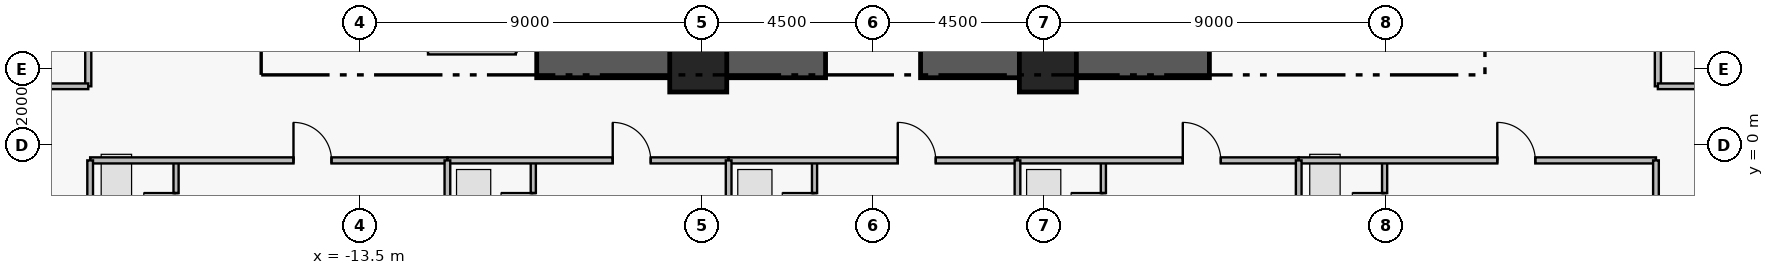
"""IFC4 building model, lengths in metres.
Left out: names, types, materials, properties, quantities, classifications, styles, units other than length and angle.
Written with IfcOpenShell. Run it as: python <this file> out.ifc"""

import sys

from ifc_helpers import new_model, si_unit, direction, frame, frame_2d, origin, origin_2d, place, context, subcontext, project, spatial, rectangle, extrude, element, fill, save


model = new_model("IFC4")
c1 = context("Model", 3, precision=1e-05, world=origin(), true_north=direction((0.0, 1.0)))
c2 = subcontext(c1, "Body", "Model", "MODEL_VIEW")
j1 = project(units=[si_unit("LENGTHUNIT", "METRE"), si_unit("PLANEANGLEUNIT", "RADIAN")], contexts=[c1])
p1 = place(None, origin())
s1 = spatial("IfcSite", under=j1, at=p1, CompositionType="ELEMENT")
p2 = place(p1, origin())
s2 = spatial("IfcBuilding", under=s1, at=p2, CompositionType="ELEMENT")
p3 = place(p2, frame((0.0, 0.0, 99.3)))
s3 = spatial("IfcBuildingStorey", under=s2, at=p3, CompositionType="ELEMENT", Elevation=99.3)
for number, where, z_axis, x_axis in (
    (1, (-8.85, 2.15, 0.0), (0.0, 0.0, 1.0), (1.0, 0.0, 0.0)),
    (2, (1.25, 2.15, 0.0), (0.0, 0.0, 1.0), (1.0, 0.0, 0.0)),
):
    element("IfcWall", number, at=place(p3, frame(where, z_axis=z_axis, x_axis=x_axis)), inside=s3, PredefinedType="SHEAR", context=c2, shape_type="SweptSolid", body=[
        extrude(rectangle(XDim=7.6, YDim=0.75, at=frame_2d((3.8, 0.0))), origin(), (0.0, 0.0, 1.0), 3.43),
    ])
for number, where, z_axis, x_axis in (
    (3, (-4.6, 2.15, 0.0), (0.0, 0.0, 1.0), (1.0, 0.0, 0.0)),
    (4, (4.6, 2.15, 0.0), (0.0, 0.0, 1.0), (1.0, 0.0, 0.0)),
):
    element("IfcColumn", number, at=place(p3, frame(where, z_axis=z_axis, x_axis=x_axis)), inside=s3, PredefinedType="COLUMN", context=c2, shape_type="SweptSolid", body=[
        extrude(rectangle(XDim=1.5, YDim=1.5, at=origin_2d()), origin(), (0.0, 0.0, 1.0), 3.65),
    ])
p4 = place(p3, frame((-18.34, -2.76, 0.0), z_axis=(0.0, 0.0, 1.0), x_axis=(0.0, 1.0, 0.0)))
e5 = element("IfcWall", 5, at=p4, inside=s3, PredefinedType="PLUMBINGWALL", context=c2, shape_type="SweptSolid", body=[
    extrude(rectangle(XDim=2.36, YDim=0.135, at=frame_2d((1.18, 0.0))), origin(), (0.0, 0.0, 1.0), 3.43),
])
p5 = place(p4, frame((0.65, 0.0, 0.0)))
e6 = element("IfcOpeningElement", 6, at=p5, cuts=e5, PredefinedType="OPENING", context=c2, shape_type="SweptSolid", body=[
    extrude(rectangle(XDim=0.85, YDim=2.1, at=frame_2d((0.425, 1.05))), frame((0.0, 0.077, 0.0), z_axis=(0.0, -1.0, 0.0), x_axis=(1.0, 0.0, 0.0)), (0.0, 0.0, 1.0), 0.155),
])
p6 = place(p3, frame((-20.6, -0.4, 0.0), z_axis=(0.0, 0.0, 1.0), x_axis=(1.0, 0.0, 0.0)))
e7 = element("IfcWall", 7, at=p6, inside=s3, PredefinedType="PARTITIONING", context=c2, shape_type="SweptSolid", body=[
    extrude(rectangle(XDim=9.4, YDim=0.16, at=frame_2d((4.7, 0.0))), origin(), (0.0, 0.0, 1.0), 3.43),
])
p7 = place(p6, frame((5.35, 0.0, 0.0)))
e8 = element("IfcOpeningElement", 8, at=p7, cuts=e7, PredefinedType="OPENING", context=c2, shape_type="SweptSolid", body=[
    extrude(rectangle(XDim=1.0, YDim=2.15, at=frame_2d((0.5, 1.075))), frame((0.0, 0.09, 0.0), z_axis=(0.0, -1.0, 0.0), x_axis=(1.0, 0.0, 0.0)), (0.0, 0.0, 1.0), 0.18),
])
p8 = place(p3, frame((-8.94, -2.76, 0.0), z_axis=(0.0, 0.0, 1.0), x_axis=(0.0, 1.0, 0.0)))
e9 = element("IfcWall", 9, at=p8, inside=s3, PredefinedType="PLUMBINGWALL", context=c2, shape_type="SweptSolid", body=[
    extrude(rectangle(XDim=2.36, YDim=0.135, at=frame_2d((1.18, 0.0))), origin(), (0.0, 0.0, 1.0), 3.43),
])
p9 = place(p8, frame((0.65, 0.0, 0.0)))
e10 = element("IfcOpeningElement", 10, at=p9, cuts=e9, PredefinedType="OPENING", context=c2, shape_type="SweptSolid", body=[
    extrude(rectangle(XDim=0.85, YDim=2.1, at=frame_2d((0.425, 1.05))), frame((0.0, 0.077, 0.0), z_axis=(0.0, -1.0, 0.0), x_axis=(1.0, 0.0, 0.0)), (0.0, 0.0, 1.0), 0.155),
])
p10 = place(p3, frame((-11.2, -0.4, 0.0), z_axis=(0.0, 0.0, 1.0), x_axis=(1.0, 0.0, 0.0)))
e11 = element("IfcWall", 11, at=p10, inside=s3, PredefinedType="PARTITIONING", context=c2, shape_type="SweptSolid", body=[
    extrude(rectangle(XDim=7.4, YDim=0.16, at=frame_2d((3.7, 0.0))), origin(), (0.0, 0.0, 1.0), 3.43),
])
p11 = place(p10, frame((4.35, 0.0, 0.0)))
e12 = element("IfcOpeningElement", 12, at=p11, cuts=e11, PredefinedType="OPENING", context=c2, shape_type="SweptSolid", body=[
    extrude(rectangle(XDim=1.0, YDim=2.15, at=frame_2d((0.5, 1.075))), frame((0.0, 0.09, 0.0), z_axis=(0.0, -1.0, 0.0), x_axis=(1.0, 0.0, 0.0)), (0.0, 0.0, 1.0), 0.18),
])
p12 = place(p3, frame((-1.54, -2.76, 0.0), z_axis=(0.0, 0.0, 1.0), x_axis=(0.0, 1.0, 0.0)))
e13 = element("IfcWall", 13, at=p12, inside=s3, PredefinedType="PLUMBINGWALL", context=c2, shape_type="SweptSolid", body=[
    extrude(rectangle(XDim=2.36, YDim=0.135, at=frame_2d((1.18, 0.0))), origin(), (0.0, 0.0, 1.0), 3.43),
])
p13 = place(p12, frame((0.65, 0.0, 0.0)))
e14 = element("IfcOpeningElement", 14, at=p13, cuts=e13, PredefinedType="OPENING", context=c2, shape_type="SweptSolid", body=[
    extrude(rectangle(XDim=0.85, YDim=2.1, at=frame_2d((0.425, 1.05))), frame((0.0, 0.077, 0.0), z_axis=(0.0, -1.0, 0.0), x_axis=(1.0, 0.0, 0.0)), (0.0, 0.0, 1.0), 0.155),
])
p14 = place(p3, frame((-3.8, -0.4, 0.0), z_axis=(0.0, 0.0, 1.0), x_axis=(1.0, 0.0, 0.0)))
e15 = element("IfcWall", 15, at=p14, inside=s3, PredefinedType="PARTITIONING", context=c2, shape_type="SweptSolid", body=[
    extrude(rectangle(XDim=7.6, YDim=0.16, at=frame_2d((3.8, 0.0))), origin(), (0.0, 0.0, 1.0), 3.43),
])
p15 = place(p14, frame((4.45, 0.0, 0.0)))
e16 = element("IfcOpeningElement", 16, at=p15, cuts=e15, PredefinedType="OPENING", context=c2, shape_type="SweptSolid", body=[
    extrude(rectangle(XDim=1.0, YDim=2.15, at=frame_2d((0.5, 1.075))), frame((0.0, 0.09, 0.0), z_axis=(0.0, -1.0, 0.0), x_axis=(1.0, 0.0, 0.0)), (0.0, 0.0, 1.0), 0.18),
])
p16 = place(p3, frame((6.06, -2.76, 0.0), z_axis=(0.0, 0.0, 1.0), x_axis=(0.0, 1.0, 0.0)))
e17 = element("IfcWall", 17, at=p16, inside=s3, PredefinedType="PLUMBINGWALL", context=c2, shape_type="SweptSolid", body=[
    extrude(rectangle(XDim=2.36, YDim=0.135, at=frame_2d((1.18, 0.0))), origin(), (0.0, 0.0, 1.0), 3.43),
])
p17 = place(p16, frame((0.65, 0.0, 0.0)))
e18 = element("IfcOpeningElement", 18, at=p17, cuts=e17, PredefinedType="OPENING", context=c2, shape_type="SweptSolid", body=[
    extrude(rectangle(XDim=0.85, YDim=2.1, at=frame_2d((0.425, 1.05))), frame((0.0, 0.077, 0.0), z_axis=(0.0, -1.0, 0.0), x_axis=(1.0, 0.0, 0.0)), (0.0, 0.0, 1.0), 0.155),
])
p18 = place(p3, frame((3.8, -0.4, 0.0), z_axis=(0.0, 0.0, 1.0), x_axis=(1.0, 0.0, 0.0)))
e19 = element("IfcWall", 19, at=p18, inside=s3, PredefinedType="PARTITIONING", context=c2, shape_type="SweptSolid", body=[
    extrude(rectangle(XDim=7.4, YDim=0.16, at=frame_2d((3.7, 0.0))), origin(), (0.0, 0.0, 1.0), 3.43),
])
p19 = place(p18, frame((4.35, 0.0, 0.0)))
e20 = element("IfcOpeningElement", 20, at=p19, cuts=e19, PredefinedType="OPENING", context=c2, shape_type="SweptSolid", body=[
    extrude(rectangle(XDim=1.0, YDim=2.15, at=frame_2d((0.5, 1.075))), frame((0.0, 0.09, 0.0), z_axis=(0.0, -1.0, 0.0), x_axis=(1.0, 0.0, 0.0)), (0.0, 0.0, 1.0), 0.18),
])
p20 = place(p3, frame((13.46, -2.76, 0.0), z_axis=(0.0, 0.0, 1.0), x_axis=(0.0, 1.0, 0.0)))
e21 = element("IfcWall", 21, at=p20, inside=s3, PredefinedType="PLUMBINGWALL", context=c2, shape_type="SweptSolid", body=[
    extrude(rectangle(XDim=2.36, YDim=0.135, at=frame_2d((1.18, 0.0))), origin(), (0.0, 0.0, 1.0), 2.747),
])
p21 = place(p20, frame((0.65, 0.0, 0.0)))
e22 = element("IfcOpeningElement", 22, at=p21, cuts=e21, PredefinedType="OPENING", context=c2, shape_type="SweptSolid", body=[
    extrude(rectangle(XDim=0.85, YDim=2.1, at=frame_2d((0.425, 1.05))), frame((0.0, 0.077, 0.0), z_axis=(0.0, -1.0, 0.0), x_axis=(1.0, 0.0, 0.0)), (0.0, 0.0, 1.0), 0.155),
])
p22 = place(p3, frame((11.2, -0.4, 0.0), z_axis=(0.0, 0.0, 1.0), x_axis=(1.0, 0.0, 0.0)))
e23 = element("IfcWall", 23, at=p22, inside=s3, PredefinedType="PARTITIONING", context=c2, shape_type="SweptSolid", body=[
    extrude(rectangle(XDim=9.4, YDim=0.16, at=frame_2d((4.7, 0.0))), origin(), (0.0, 0.0, 1.0), 3.43),
])
p23 = place(p22, frame((5.225, 0.0, 0.0)))
e24 = element("IfcOpeningElement", 24, at=p23, cuts=e23, PredefinedType="OPENING", context=c2, shape_type="SweptSolid", body=[
    extrude(rectangle(XDim=1.0, YDim=2.15, at=frame_2d((0.5, 1.075))), frame((0.0, 0.09, 0.0), z_axis=(0.0, -1.0, 0.0), x_axis=(1.0, 0.0, 0.0)), (0.0, 0.0, 1.0), 0.18),
])
p24 = place(p3, frame((20.65, 1.55, 0.0), z_axis=(0.0, 0.0, 1.0), x_axis=(0.0, 1.0, 0.0)))
e25 = element("IfcWall", 25, at=p24, inside=s3, PredefinedType="PARTITIONING", context=c2, shape_type="SweptSolid", body=[
    extrude(rectangle(XDim=6.25, YDim=0.16, at=frame_2d((3.125, 0.0))), origin(), (0.0, 0.0, 1.0), 3.43),
])
p25 = place(p24, frame((2.665, 0.0, 0.0)))
e26 = element("IfcOpeningElement", 26, at=p25, cuts=e25, PredefinedType="OPENING", context=c2, shape_type="SweptSolid", body=[
    extrude(rectangle(XDim=0.92, YDim=2.12, at=frame_2d((0.46, 1.06))), frame((0.0, 0.09, 0.0), z_axis=(0.0, -1.0, 0.0), x_axis=(1.0, 0.0, 0.0)), (0.0, 0.0, 1.0), 0.18),
])
p26 = place(p3, frame((-20.65, 1.55, 0.0), z_axis=(0.0, 0.0, 1.0), x_axis=(0.0, 1.0, 0.0)))
e27 = element("IfcWall", 27, at=p26, inside=s3, PredefinedType="PARTITIONING", context=c2, shape_type="SweptSolid", body=[
    extrude(rectangle(XDim=6.35, YDim=0.16, at=frame_2d((3.175, 0.0))), origin(), (0.0, 0.0, 1.0), 3.43),
])
p27 = place(p26, frame((2.7, 0.0, 0.0)))
e28 = element("IfcOpeningElement", 28, at=p27, cuts=e27, PredefinedType="OPENING", context=c2, shape_type="SweptSolid", body=[
    extrude(rectangle(XDim=0.95, YDim=2.15, at=frame_2d((0.475, 1.075))), frame((0.0, 0.09, 0.0), z_axis=(0.0, -1.0, 0.0), x_axis=(1.0, 0.0, 0.0)), (0.0, 0.0, 1.0), 0.18),
])
p28 = place(p3, frame((-11.71, 2.47, 0.0), z_axis=(0.0, 0.0, 1.0), x_axis=(1.0, 0.0, 0.0)))
e29 = element("IfcWall", 29, at=p28, inside=s3, PredefinedType="PARTITIONING", context=c2, shape_type="SweptSolid", body=[
    extrude(rectangle(XDim=2.31, YDim=0.165, at=frame_2d((1.155, 0.0))), origin(), (0.0, 0.0, 1.0), 2.03),
])
p29 = place(p3, frame((-20.6, -11.9, 0.0), z_axis=(0.0, 0.0, 1.0), x_axis=(0.0, 1.0, 0.0)))
e30 = element("IfcWall", 30, at=p29, inside=s3, PredefinedType="PARTITIONING", context=c2, shape_type="SweptSolid", body=[
    extrude(rectangle(XDim=11.5, YDim=0.15, at=frame_2d((5.75, 0.0))), origin(), (0.0, 0.0, 1.0), 3.43),
])
for number, where, z_axis, x_axis in (
    (31, (-11.2, -15.32, 0.0), (0.0, 0.0, 1.0), (0.0, 1.0, 0.0)),
    (32, (-3.8, -15.32, 0.0), (0.0, 0.0, 1.0), (0.0, 1.0, 0.0)),
    (33, (3.8, -15.32, 0.0), (0.0, 0.0, 1.0), (0.0, 1.0, 0.0)),
    (34, (11.2, -15.32, 0.0), (0.0, 0.0, 1.0), (0.0, 1.0, 0.0)),
):
    element("IfcWall", number, at=place(p3, frame(where, z_axis=z_axis, x_axis=x_axis)), inside=s3, PredefinedType="PARTITIONING", context=c2, shape_type="SweptSolid", body=[
        extrude(rectangle(XDim=14.92, YDim=0.15, at=frame_2d((7.46, 0.0))), origin(), (0.0, 0.0, 1.0), 3.43),
    ])
p30 = place(p3, frame((20.6, -11.9, 0.0), z_axis=(0.0, 0.0, 1.0), x_axis=(0.0, 1.0, 0.0)))
e35 = element("IfcWall", 35, at=p30, inside=s3, PredefinedType="PARTITIONING", context=c2, shape_type="SweptSolid", body=[
    extrude(rectangle(XDim=11.5, YDim=0.15, at=frame_2d((5.75, 0.0))), origin(), (0.0, 0.0, 1.0), 3.43),
])
for number, where, z_axis, x_axis in (
    (36, (20.65, 1.55, 0.0), (0.0, 0.0, 1.0), (1.0, 0.0, 0.0)),
    (37, (-23.867, 1.55, 0.0), (0.0, 0.0, 1.0), (1.0, 0.0, 0.0)),
):
    element("IfcWall", number, at=place(p3, frame(where, z_axis=z_axis, x_axis=x_axis)), inside=s3, PredefinedType="PARTITIONING", context=c2, shape_type="SweptSolid", body=[
        extrude(rectangle(XDim=3.217, YDim=0.15, at=frame_2d((1.608, 0.0))), origin(), (0.0, 0.0, 1.0), 3.43),
    ])
p31 = place(p5, origin())
e38 = element("IfcDoor", 38, at=p31, inside=s3, OperationType="SINGLE_SWING_RIGHT", PredefinedType="DOOR", context=c2, shape_type="SweptSolid", body=[
    extrude(rectangle(XDim=0.85, YDim=2.1, at=frame_2d((0.425, 1.05))), frame((0.0, 0.025, 0.0), z_axis=(0.0, -1.0, 0.0), x_axis=(1.0, 0.0, 0.0)), (0.0, 0.0, 1.0), 0.05),
])
fill(e6, e38)
p32 = place(p7, origin())
e39 = element("IfcDoor", 39, at=p32, inside=s3, OperationType="SINGLE_SWING_LEFT", PredefinedType="DOOR", context=c2, shape_type="SweptSolid", body=[
    extrude(rectangle(XDim=1.0, YDim=2.15, at=frame_2d((0.5, 1.075))), frame((0.0, 0.025, 0.0), z_axis=(0.0, -1.0, 0.0), x_axis=(1.0, 0.0, 0.0)), (0.0, 0.0, 1.0), 0.05),
])
fill(e8, e39)
p33 = place(p9, origin())
e40 = element("IfcDoor", 40, at=p33, inside=s3, OperationType="SINGLE_SWING_RIGHT", PredefinedType="DOOR", context=c2, shape_type="SweptSolid", body=[
    extrude(rectangle(XDim=0.85, YDim=2.1, at=frame_2d((0.425, 1.05))), frame((0.0, 0.025, 0.0), z_axis=(0.0, -1.0, 0.0), x_axis=(1.0, 0.0, 0.0)), (0.0, 0.0, 1.0), 0.05),
])
fill(e10, e40)
p34 = place(p11, origin())
e41 = element("IfcDoor", 41, at=p34, inside=s3, OperationType="SINGLE_SWING_LEFT", PredefinedType="DOOR", context=c2, shape_type="SweptSolid", body=[
    extrude(rectangle(XDim=1.0, YDim=2.15, at=frame_2d((0.5, 1.075))), frame((0.0, 0.025, 0.0), z_axis=(0.0, -1.0, 0.0), x_axis=(1.0, 0.0, 0.0)), (0.0, 0.0, 1.0), 0.05),
])
fill(e12, e41)
p35 = place(p13, origin())
e42 = element("IfcDoor", 42, at=p35, inside=s3, OperationType="SINGLE_SWING_RIGHT", PredefinedType="DOOR", context=c2, shape_type="SweptSolid", body=[
    extrude(rectangle(XDim=0.85, YDim=2.1, at=frame_2d((0.425, 1.05))), frame((0.0, 0.025, 0.0), z_axis=(0.0, -1.0, 0.0), x_axis=(1.0, 0.0, 0.0)), (0.0, 0.0, 1.0), 0.05),
])
fill(e14, e42)
p36 = place(p15, origin())
e43 = element("IfcDoor", 43, at=p36, inside=s3, OperationType="SINGLE_SWING_LEFT", PredefinedType="DOOR", context=c2, shape_type="SweptSolid", body=[
    extrude(rectangle(XDim=1.0, YDim=2.15, at=frame_2d((0.5, 1.075))), frame((0.0, 0.025, 0.0), z_axis=(0.0, -1.0, 0.0), x_axis=(1.0, 0.0, 0.0)), (0.0, 0.0, 1.0), 0.05),
])
fill(e16, e43)
p37 = place(p17, origin())
e44 = element("IfcDoor", 44, at=p37, inside=s3, OperationType="SINGLE_SWING_RIGHT", PredefinedType="DOOR", context=c2, shape_type="SweptSolid", body=[
    extrude(rectangle(XDim=0.85, YDim=2.1, at=frame_2d((0.425, 1.05))), frame((0.0, 0.025, 0.0), z_axis=(0.0, -1.0, 0.0), x_axis=(1.0, 0.0, 0.0)), (0.0, 0.0, 1.0), 0.05),
])
fill(e18, e44)
p38 = place(p19, origin())
e45 = element("IfcDoor", 45, at=p38, inside=s3, OperationType="SINGLE_SWING_LEFT", PredefinedType="DOOR", context=c2, shape_type="SweptSolid", body=[
    extrude(rectangle(XDim=1.0, YDim=2.15, at=frame_2d((0.5, 1.075))), frame((0.0, 0.025, 0.0), z_axis=(0.0, -1.0, 0.0), x_axis=(1.0, 0.0, 0.0)), (0.0, 0.0, 1.0), 0.05),
])
fill(e20, e45)
p39 = place(p21, origin())
e46 = element("IfcDoor", 46, at=p39, inside=s3, OperationType="SINGLE_SWING_RIGHT", PredefinedType="DOOR", context=c2, shape_type="SweptSolid", body=[
    extrude(rectangle(XDim=0.85, YDim=2.1, at=frame_2d((0.425, 1.05))), frame((0.0, 0.025, 0.0), z_axis=(0.0, -1.0, 0.0), x_axis=(1.0, 0.0, 0.0)), (0.0, 0.0, 1.0), 0.05),
])
fill(e22, e46)
p40 = place(p23, origin())
e47 = element("IfcDoor", 47, at=p40, inside=s3, OperationType="SINGLE_SWING_LEFT", PredefinedType="DOOR", context=c2, shape_type="SweptSolid", body=[
    extrude(rectangle(XDim=1.0, YDim=2.15, at=frame_2d((0.5, 1.075))), frame((0.0, 0.025, 0.0), z_axis=(0.0, -1.0, 0.0), x_axis=(1.0, 0.0, 0.0)), (0.0, 0.0, 1.0), 0.05),
])
fill(e24, e47)
save(model, sys.argv[1])
